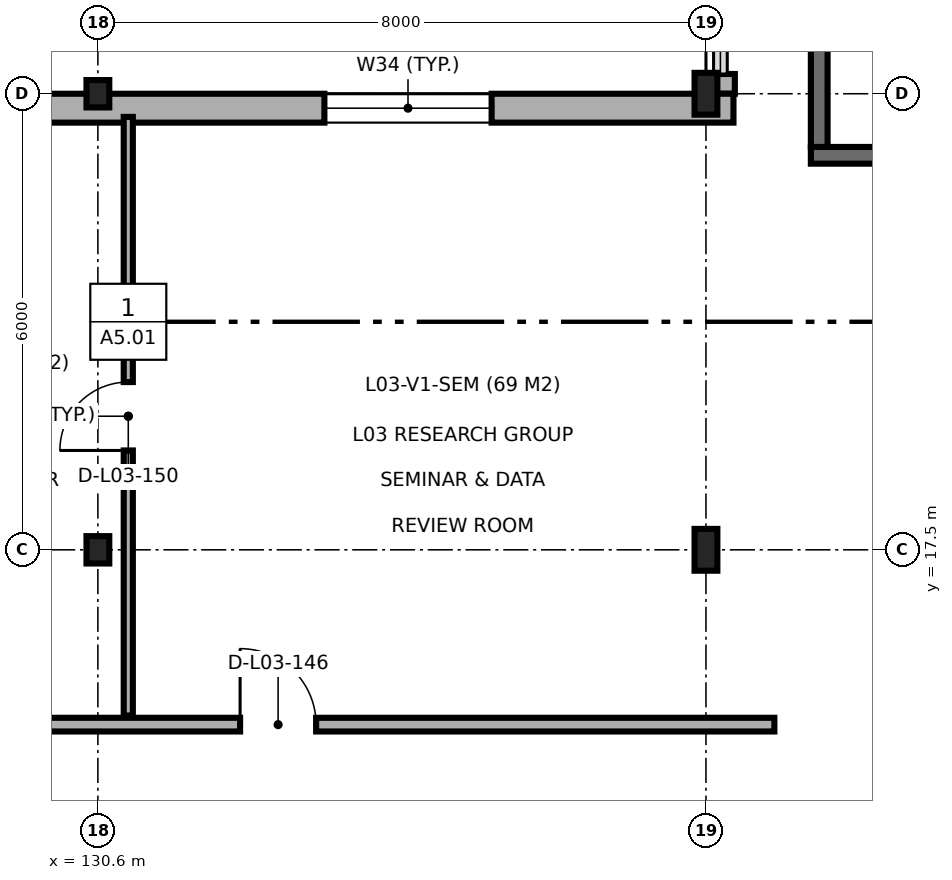
"""IFC4 building model, lengths in metres.
Left out: names, types, materials, properties, quantities, classifications, styles, units other than length and angle.
Written with IfcOpenShell. Run it as: python <this file> out.ifc"""

import sys

from ifc_helpers import new_model, si_unit, direction, frame, frame_2d, origin, origin_2d, place, context, subcontext, project, spatial, rectangle, i_section, extrude, element, fill, save


model = new_model("IFC4")
c1 = context("Model", 3, precision=1e-05, world=origin(), true_north=direction((0.0, 1.0)))
c2 = subcontext(c1, "Body", "Model", "MODEL_VIEW")
j1 = project(units=[si_unit("LENGTHUNIT", "METRE"), si_unit("PLANEANGLEUNIT", "RADIAN")], contexts=[c1])
p1 = place(None, origin())
s1 = spatial("IfcSite", under=j1, at=p1, CompositionType="ELEMENT")
p2 = place(p1, origin())
s2 = spatial("IfcBuilding", under=s1, at=p2, CompositionType="ELEMENT")
p3 = place(p2, frame((0.0, 0.0, 13.8)))
s3 = spatial("IfcBuildingStorey", under=s2, at=p3, CompositionType="ELEMENT", Elevation=13.8)
for number, where, z_axis, x_axis in (
    (1, (130.6, 17.5, 0.0), (0.0, 0.0, 1.0), (1.0, 0.0, 0.0)),
    (2, (130.6, 23.5, 0.0), (0.0, 0.0, 1.0), (1.0, 0.0, 0.0)),
):
    element("IfcColumn", number, at=place(p3, frame(where, z_axis=z_axis, x_axis=x_axis)), inside=s3, PredefinedType="COLUMN", context=c2, shape_type="SweptSolid", body=[
        extrude(i_section(OverallWidth=0.3, OverallDepth=0.36, WebThickness=0.012, FlangeThickness=0.022, FilletRadius=0.027, at=origin_2d()), origin(), (0.0, 0.0, 1.0), 4.5),
    ])
for number, where, z_axis, x_axis in (
    (3, (138.6, 17.5, 0.0), (0.0, 0.0, 1.0), (1.0, 0.0, 0.0)),
    (4, (138.6, 23.5, 0.0), (0.0, 0.0, 1.0), (1.0, 0.0, 0.0)),
):
    element("IfcColumn", number, at=place(p3, frame(where, z_axis=z_axis, x_axis=x_axis)), inside=s3, PredefinedType="COLUMN", context=c2, shape_type="SweptSolid", body=[
        extrude(i_section(OverallWidth=0.3, OverallDepth=0.55, WebThickness=0.015, FlangeThickness=0.029, FilletRadius=0.027, at=origin_2d()), origin(), (0.0, 0.0, 1.0), 4.5),
    ])
p4 = place(p3, frame((139.98, 22.69, 0.0), z_axis=(0.0, 0.0, 1.0), x_axis=(1.0, 0.0, 0.0)))
e5 = element("IfcWall", 5, at=p4, inside=s3, PredefinedType="SOLIDWALL", context=c2, shape_type="SweptSolid", body=[
    extrude(rectangle(XDim=3.24, YDim=0.22, at=frame_2d((1.62, 0.0))), origin(), (0.0, 0.0, 1.0), 4.25),
])
p5 = place(p4, frame((0.9, 0.0, 0.0)))
e6 = element("IfcOpeningElement", 6, at=p5, cuts=e5, PredefinedType="OPENING", context=c2, shape_type="SweptSolid", body=[
    extrude(rectangle(XDim=1.25, YDim=2.15, at=frame_2d((0.625, 1.075))), frame((0.0, 0.12, 0.0), z_axis=(0.0, -1.0, 0.0), x_axis=(1.0, 0.0, 0.0)), (0.0, 0.0, 1.0), 0.24),
])
p6 = place(p3, frame((140.09, 28.8, 0.0), z_axis=(0.0, 0.0, 1.0), x_axis=(0.0, -1.0, 0.0)))
e7 = element("IfcWall", 7, at=p6, inside=s3, PredefinedType="SOLIDWALL", context=c2, shape_type="SweptSolid", body=[
    extrude(rectangle(XDim=6.0, YDim=0.22, at=frame_2d((3.0, 0.0))), origin(), (0.0, 0.0, 1.0), 4.25),
])
p7 = place(p3, frame((138.79, 23.76, 0.0), z_axis=(0.0, 0.0, 1.0), x_axis=(0.0, -1.0, 0.0)))
e8 = element("IfcWall", 8, at=p7, inside=s3, PredefinedType="SOLIDWALL", context=c2, shape_type="SweptSolid", body=[
    extrude(rectangle(XDim=0.26, YDim=0.38, at=frame_2d((0.13, 0.0))), origin(), (0.0, 0.0, 1.0), 4.25),
])
p8 = place(p3, frame((138.962, 23.31, 0.0), z_axis=(0.0, 0.0, 1.0), x_axis=(-1.0, 0.0, 0.0)))
e9 = element("IfcWall", 9, at=p8, inside=s3, PredefinedType="SOLIDWALL", context=c2, shape_type="SweptSolid", body=[
    extrude(rectangle(XDim=33.9, YDim=0.38, at=frame_2d((16.95, 0.0))), origin(), (0.0, 0.0, 1.0), 4.24),
])
p9 = place(p8, frame((3.182, 0.0, 0.9)))
e10 = element("IfcOpeningElement", 10, at=p9, cuts=e9, PredefinedType="OPENING", context=c2, shape_type="SweptSolid", body=[
    extrude(rectangle(XDim=2.2, YDim=1.65, at=frame_2d((1.1, 0.825))), frame((0.0, 0.2, 0.0), z_axis=(0.0, -1.0, 0.0), x_axis=(1.0, 0.0, 0.0)), (0.0, 0.0, 1.0), 0.4),
])
p10 = place(p8, frame((9.032, 0.0, 0.9)))
e11 = element("IfcOpeningElement", 11, at=p10, cuts=e9, PredefinedType="OPENING", context=c2, shape_type="SweptSolid", body=[
    extrude(rectangle(XDim=0.9, YDim=1.8, at=frame_2d((0.45, 0.9))), frame((0.0, 0.2, 0.0), z_axis=(0.0, -1.0, 0.0), x_axis=(1.0, 0.0, 0.0)), (0.0, 0.0, 1.0), 0.4),
])
p11 = place(p8, frame((12.192, 0.0, 0.9)))
e12 = element("IfcOpeningElement", 12, at=p11, cuts=e9, PredefinedType="OPENING", context=c2, shape_type="SweptSolid", body=[
    extrude(rectangle(XDim=2.1, YDim=1.8, at=frame_2d((1.05, 0.9))), frame((0.0, 0.2, 0.0), z_axis=(0.0, -1.0, 0.0), x_axis=(1.0, 0.0, 0.0)), (0.0, 0.0, 1.0), 0.4),
])
p12 = place(p8, frame((17.132, 0.0, 0.9)))
e13 = element("IfcOpeningElement", 13, at=p12, cuts=e9, PredefinedType="OPENING", context=c2, shape_type="SweptSolid", body=[
    extrude(rectangle(XDim=2.7, YDim=1.8, at=frame_2d((1.35, 0.9))), frame((0.0, 0.2, 0.0), z_axis=(0.0, -1.0, 0.0), x_axis=(1.0, 0.0, 0.0)), (0.0, 0.0, 1.0), 0.4),
])
p13 = place(p8, frame((20.912, 0.0, 0.9)))
e14 = element("IfcOpeningElement", 14, at=p13, cuts=e9, PredefinedType="OPENING", context=c2, shape_type="SweptSolid", body=[
    extrude(rectangle(XDim=0.9, YDim=1.8, at=frame_2d((0.45, 0.9))), frame((0.0, 0.2, 0.0), z_axis=(0.0, -1.0, 0.0), x_axis=(1.0, 0.0, 0.0)), (0.0, 0.0, 1.0), 0.4),
])
p14 = place(p8, frame((22.792, 0.0, 0.9)))
e15 = element("IfcOpeningElement", 15, at=p14, cuts=e9, PredefinedType="OPENING", context=c2, shape_type="SweptSolid", body=[
    extrude(rectangle(XDim=0.9, YDim=1.8, at=frame_2d((0.45, 0.9))), frame((0.0, 0.2, 0.0), z_axis=(0.0, -1.0, 0.0), x_axis=(1.0, 0.0, 0.0)), (0.0, 0.0, 1.0), 0.4),
])
p15 = place(p8, frame((27.162, 0.0, 0.9)))
e16 = element("IfcOpeningElement", 16, at=p15, cuts=e9, PredefinedType="OPENING", context=c2, shape_type="SweptSolid", body=[
    extrude(rectangle(XDim=2.4, YDim=2.1, at=frame_2d((1.2, 1.05))), frame((0.0, 0.2, 0.0), z_axis=(0.0, -1.0, 0.0), x_axis=(1.0, 0.0, 0.0)), (0.0, 0.0, 1.0), 0.4),
])
p16 = place(p3, frame((105.005, 15.2, 0.0), z_axis=(0.0, 0.0, 1.0), x_axis=(1.0, 0.0, 0.0)))
e17 = element("IfcWall", 17, at=p16, inside=s3, PredefinedType="PARTITIONING", context=c2, shape_type="SweptSolid", body=[
    extrude(rectangle(XDim=34.495, YDim=0.18, at=frame_2d((17.248, 0.0))), origin(), (0.0, 0.0, 1.0), 4.25),
])
p17 = place(p16, frame((7.391, 0.0, 0.0)))
e18 = element("IfcOpeningElement", 18, at=p17, cuts=e17, PredefinedType="OPENING", context=c2, shape_type="SweptSolid", body=[
    extrude(rectangle(XDim=0.9, YDim=2.1, at=frame_2d((0.45, 1.05))), frame((0.0, 0.1, 0.0), z_axis=(0.0, -1.0, 0.0), x_axis=(1.0, 0.0, 0.0)), (0.0, 0.0, 1.0), 0.2),
])
p18 = place(p16, frame((18.45, 0.0, 0.0)))
e19 = element("IfcOpeningElement", 19, at=p18, cuts=e17, PredefinedType="OPENING", context=c2, shape_type="SweptSolid", body=[
    extrude(rectangle(XDim=0.95, YDim=2.1, at=frame_2d((0.475, 1.05))), frame((0.0, 0.1, 0.0), z_axis=(0.0, -1.0, 0.0), x_axis=(1.0, 0.0, 0.0)), (0.0, 0.0, 1.0), 0.2),
])
p19 = place(p16, frame((27.466, 0.0, 0.0)))
e20 = element("IfcOpeningElement", 20, at=p19, cuts=e17, PredefinedType="OPENING", context=c2, shape_type="SweptSolid", body=[
    extrude(rectangle(XDim=1.0, YDim=2.15, at=frame_2d((0.5, 1.075))), frame((0.0, 0.1, 0.0), z_axis=(0.0, -1.0, 0.0), x_axis=(1.0, 0.0, 0.0)), (0.0, 0.0, 1.0), 0.2),
])
p20 = place(p3, frame((131.0, 15.32, 0.0), z_axis=(0.0, 0.0, 1.0), x_axis=(0.0, 1.0, 0.0)))
e21 = element("IfcWall", 21, at=p20, inside=s3, PredefinedType="PARTITIONING", context=c2, shape_type="SweptSolid", body=[
    extrude(rectangle(XDim=7.875, YDim=0.12, at=frame_2d((3.938, 0.0))), origin(), (0.0, 0.0, 1.0), 4.25),
])
p21 = place(p20, frame((3.487, 0.0, 0.0)))
e22 = element("IfcOpeningElement", 22, at=p21, cuts=e21, PredefinedType="OPENING", context=c2, shape_type="SweptSolid", body=[
    extrude(rectangle(XDim=0.9, YDim=2.1, at=frame_2d((0.45, 1.05))), frame((0.0, 0.07, 0.0), z_axis=(0.0, -1.0, 0.0), x_axis=(1.0, 0.0, 0.0)), (0.0, 0.0, 1.0), 0.14),
])
p22 = place(p9, origin())
e23 = element("IfcWindow", 23, at=p22, inside=s3, PartitioningType="SINGLE_PANEL", PredefinedType="WINDOW", context=c2, shape_type="SweptSolid", body=[
    extrude(rectangle(XDim=2.2, YDim=1.65, at=frame_2d((1.1, 0.825))), frame((0.0, 0.03, 0.0), z_axis=(0.0, -1.0, 0.0), x_axis=(1.0, 0.0, 0.0)), (0.0, 0.0, 1.0), 0.06),
])
fill(e10, e23)
p23 = place(p19, origin())
e24 = element("IfcDoor", 24, at=p23, inside=s3, OperationType="SINGLE_SWING_LEFT", PredefinedType="DOOR", context=c2, shape_type="SweptSolid", body=[
    extrude(rectangle(XDim=1.0, YDim=2.15, at=frame_2d((0.5, 1.075))), frame((0.0, 0.025, 0.0), z_axis=(0.0, -1.0, 0.0), x_axis=(1.0, 0.0, 0.0)), (0.0, 0.0, 1.0), 0.05),
])
fill(e20, e24)
p24 = place(p21, origin())
e25 = element("IfcDoor", 25, at=p24, inside=s3, OperationType="SINGLE_SWING_LEFT", PredefinedType="DOOR", context=c2, shape_type="SweptSolid", body=[
    extrude(rectangle(XDim=0.9, YDim=2.1, at=frame_2d((0.45, 1.05))), frame((0.0, 0.025, 0.0), z_axis=(0.0, -1.0, 0.0), x_axis=(1.0, 0.0, 0.0)), (0.0, 0.0, 1.0), 0.05),
])
fill(e22, e25)
save(model, sys.argv[1])
